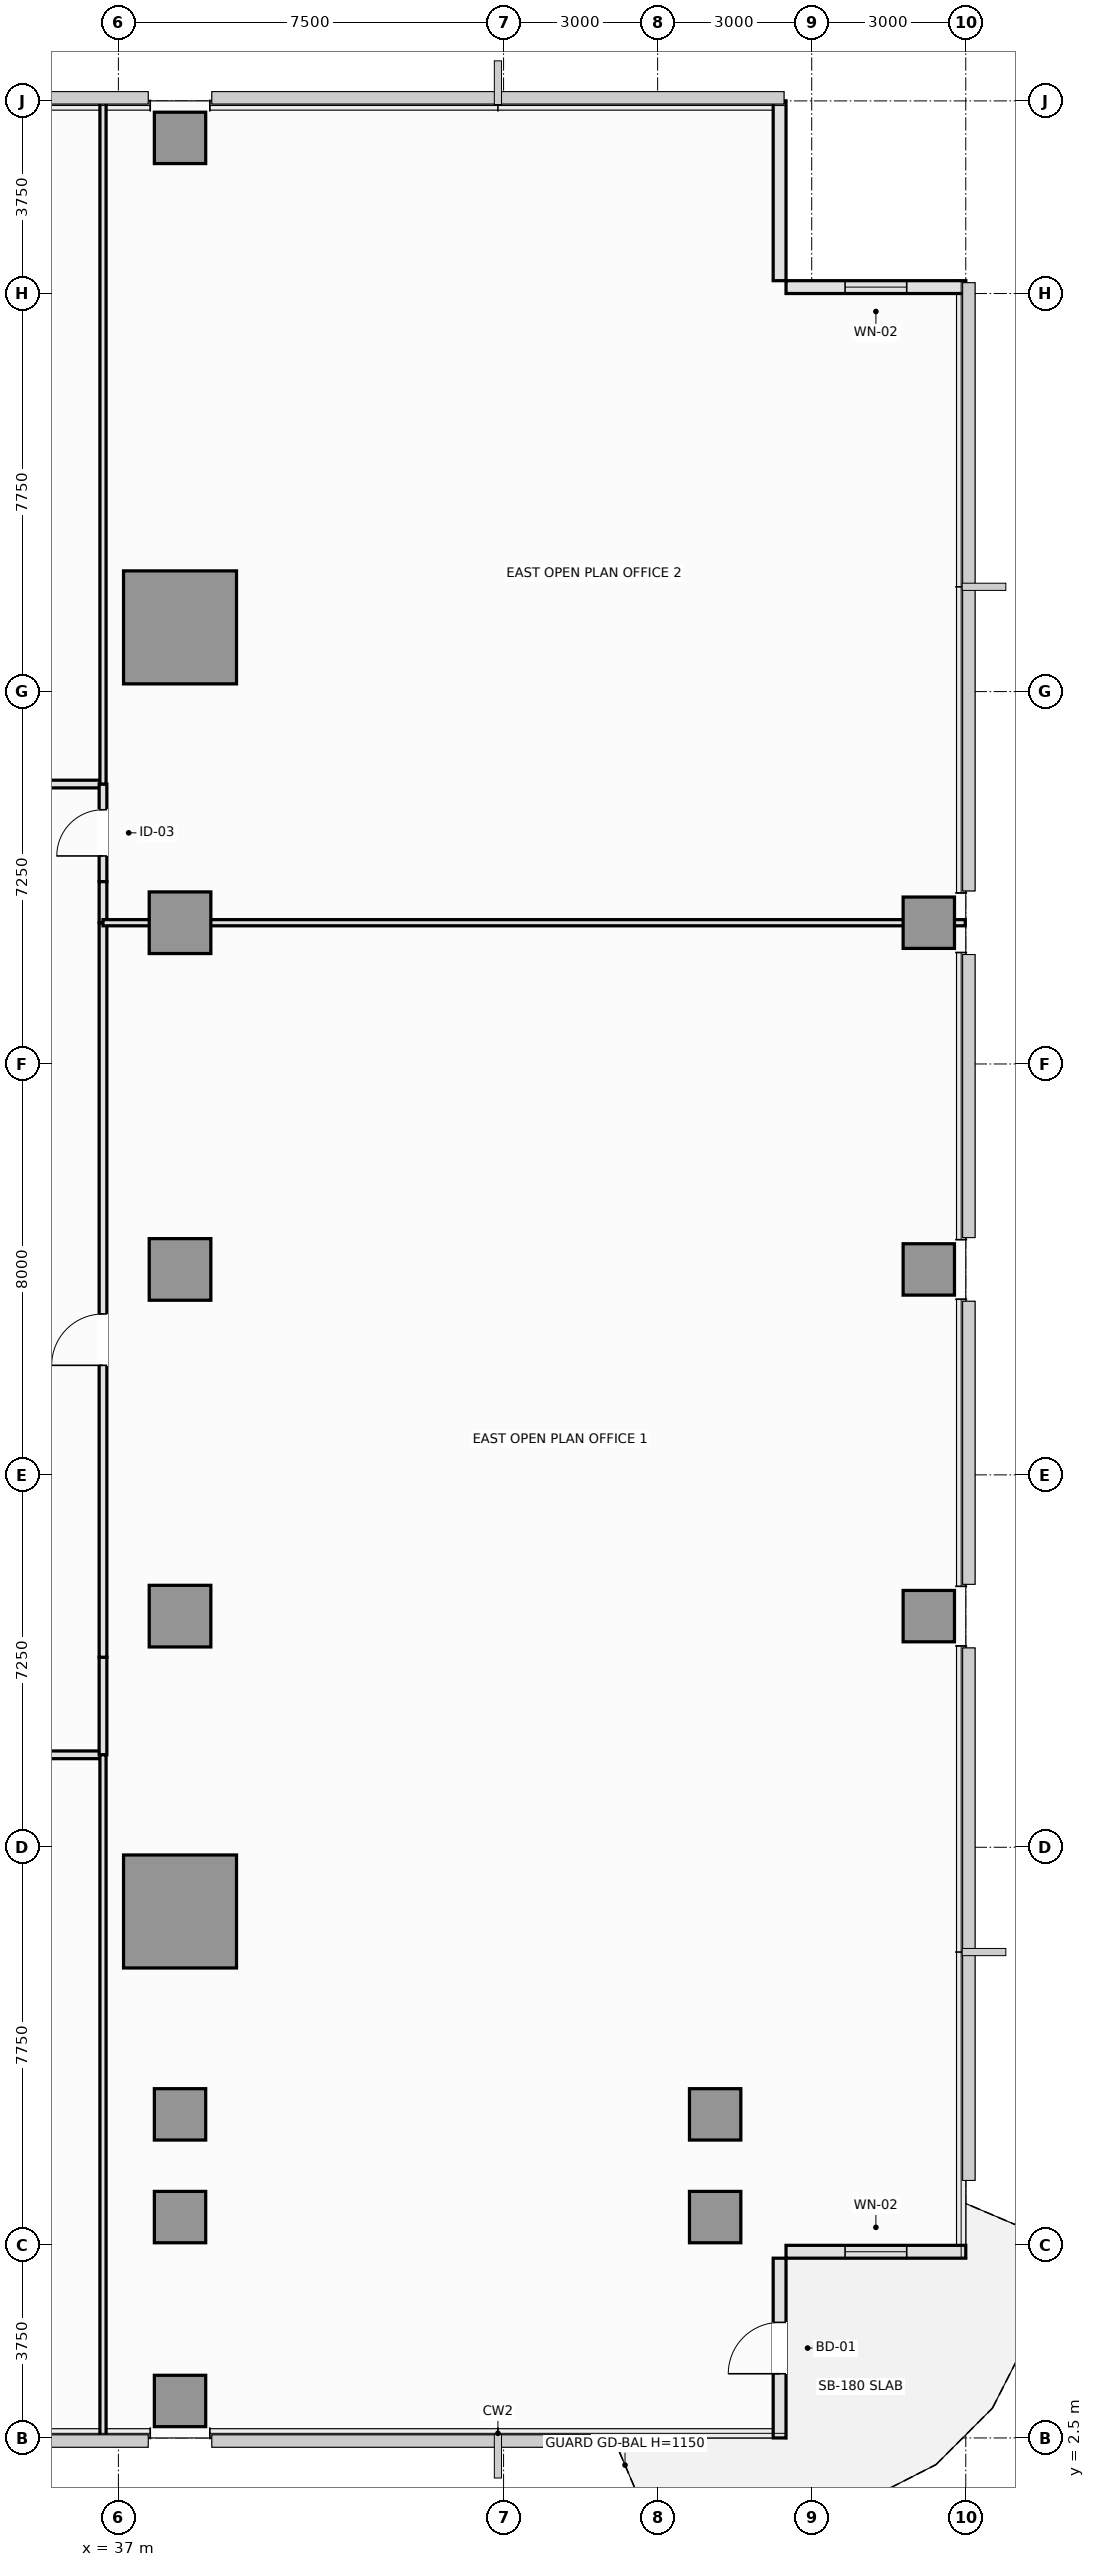
"""IFC4 building model, lengths in metres.
Left out: names, types, materials, properties, quantities, classifications, styles, units other than length and angle.
Written with IfcOpenShell. Run it as: python <this file> out.ifc"""

import sys

from ifc_helpers import new_model, si_unit, direction, frame, frame_2d, origin, origin_2d, place, context, subcontext, project, spatial, rectangle, extrude, element, fill, save


model = new_model("IFC4")
c1 = context("Model", 3, precision=1e-05, world=origin(), true_north=direction((0.0, 1.0)))
c2 = subcontext(c1, "Body", "Model", "MODEL_VIEW")
j1 = project(units=[si_unit("LENGTHUNIT", "METRE"), si_unit("PLANEANGLEUNIT", "RADIAN")], contexts=[c1])
p1 = place(None, origin())
s1 = spatial("IfcSite", under=j1, at=p1, CompositionType="ELEMENT")
p2 = place(p1, origin())
s2 = spatial("IfcBuilding", under=s1, at=p2, CompositionType="ELEMENT")
p3 = place(p2, frame((0.0, 0.0, 75.3)))
s3 = spatial("IfcBuildingStorey", under=s2, at=p3, CompositionType="ELEMENT", Elevation=75.3)
for number, where, z_axis, x_axis in (
    (1, (38.2, 12.75, 0.0), (0.0, 0.0, 1.0), (1.0, 0.0, 0.0)),
    (2, (38.2, 37.75, 0.0), (0.0, 0.0, 1.0), (1.0, 0.0, 0.0)),
):
    element("IfcColumn", number, at=place(p3, frame(where, z_axis=z_axis, x_axis=x_axis)), inside=s3, PredefinedType="COLUMN", context=c2, shape_type="SweptSolid", body=[
        extrude(rectangle(XDim=2.2, YDim=2.2, at=origin_2d()), origin(), (0.0, 0.0, 1.0), 3.55),
    ])
for number, where, z_axis, x_axis in (
    (3, (38.2, 18.5, 0.0), (0.0, 0.0, 1.0), (1.0, 0.0, 0.0)),
    (4, (38.2, 25.25, 0.0), (0.0, 0.0, 1.0), (1.0, 0.0, 0.0)),
    (5, (38.2, 32.0, 0.0), (0.0, 0.0, 1.0), (1.0, 0.0, 0.0)),
):
    element("IfcColumn", number, at=place(p3, frame(where, z_axis=z_axis, x_axis=x_axis)), inside=s3, PredefinedType="COLUMN", context=c2, shape_type="SweptSolid", body=[
        extrude(rectangle(XDim=1.2, YDim=1.2, at=origin_2d()), origin(), (0.0, 0.0, 1.0), 3.55),
    ])
for number, where, z_axis, x_axis in (
    (6, (48.62, 6.8, 0.0), (0.0, 0.0, 1.0), (1.0, 0.0, 0.0)),
    (7, (38.2, 6.8, 0.0), (0.0, 0.0, 1.0), (1.0, 0.0, 0.0)),
    (8, (38.2, 8.8, 0.0), (0.0, 0.0, 1.0), (1.0, 0.0, 0.0)),
    (9, (48.62, 8.8, 0.0), (0.0, 0.0, 1.0), (1.0, 0.0, 0.0)),
    (10, (52.78, 18.5, 0.0), (0.0, 0.0, 1.0), (1.0, 0.0, 0.0)),
    (11, (52.78, 25.25, 0.0), (0.0, 0.0, 1.0), (1.0, 0.0, 0.0)),
    (12, (52.78, 32.0, 0.0), (0.0, 0.0, 1.0), (1.0, 0.0, 0.0)),
    (13, (38.2, 3.22, 0.0), (0.0, 0.0, 1.0), (1.0, 0.0, 0.0)),
    (14, (38.2, 47.28, 0.0), (0.0, 0.0, 1.0), (1.0, 0.0, 0.0)),
):
    element("IfcColumn", number, at=place(p3, frame(where, z_axis=z_axis, x_axis=x_axis)), inside=s3, PredefinedType="COLUMN", context=c2, shape_type="SweptSolid", body=[
        extrude(rectangle(XDim=1.0, YDim=1.0, at=origin_2d()), origin(), (0.0, 0.0, 1.0), 3.55),
    ])
p4 = place(p3, frame((49.875, 2.5, 0.0), z_axis=(0.0, 0.0, 1.0), x_axis=(0.0, 1.0, 0.0)))
e15 = element("IfcWall", 15, at=p4, inside=s3, PredefinedType="SOLIDWALL", context=c2, shape_type="SweptSolid", body=[
    extrude(rectangle(XDim=3.5, YDim=0.25, at=frame_2d((1.75, 0.0))), origin(), (0.0, 0.0, 1.0), 3.07),
])
p5 = place(p4, frame((1.25, 0.0, 0.0)))
e16 = element("IfcOpeningElement", 16, at=p5, cuts=e15, PredefinedType="OPENING", context=c2, shape_type="SweptSolid", body=[
    extrude(rectangle(XDim=1.0, YDim=2.2, at=frame_2d((0.5, 1.1))), frame((0.0, 0.135, 0.0), z_axis=(0.0, -1.0, 0.0), x_axis=(1.0, 0.0, 0.0)), (0.0, 0.0, 1.0), 0.27),
])
p6 = place(p3, frame((50.0, 6.125, 0.0), z_axis=(0.0, 0.0, 1.0), x_axis=(1.0, 0.0, 0.0)))
e17 = element("IfcWall", 17, at=p6, inside=s3, PredefinedType="SOLIDWALL", context=c2, shape_type="SweptSolid", body=[
    extrude(rectangle(XDim=3.5, YDim=0.25, at=frame_2d((1.75, 0.0))), origin(), (0.0, 0.0, 1.0), 3.07),
])
p7 = place(p6, frame((1.15, 0.0, 0.9)))
e18 = element("IfcOpeningElement", 18, at=p7, cuts=e17, PredefinedType="OPENING", context=c2, shape_type="SweptSolid", body=[
    extrude(rectangle(XDim=1.2, YDim=1.8, at=frame_2d((0.6, 0.9))), frame((0.0, 0.135, 0.0), z_axis=(0.0, -1.0, 0.0), x_axis=(1.0, 0.0, 0.0)), (0.0, 0.0, 1.0), 0.27),
])
p8 = place(p3, frame((53.5, 44.375, 0.0), z_axis=(0.0, 0.0, 1.0), x_axis=(-1.0, 0.0, 0.0)))
e19 = element("IfcWall", 19, at=p8, inside=s3, PredefinedType="SOLIDWALL", context=c2, shape_type="SweptSolid", body=[
    extrude(rectangle(XDim=3.5, YDim=0.25, at=frame_2d((1.75, 0.0))), origin(), (0.0, 0.0, 1.0), 3.37),
])
p9 = place(p8, frame((1.15, 0.0, 0.9)))
e20 = element("IfcOpeningElement", 20, at=p9, cuts=e19, PredefinedType="OPENING", context=c2, shape_type="SweptSolid", body=[
    extrude(rectangle(XDim=1.2, YDim=1.8, at=frame_2d((0.6, 0.9))), frame((0.0, 0.135, 0.0), z_axis=(0.0, -1.0, 0.0), x_axis=(1.0, 0.0, 0.0)), (0.0, 0.0, 1.0), 0.27),
])
p10 = place(p3, frame((49.875, 44.5, 0.0), z_axis=(0.0, 0.0, 1.0), x_axis=(0.0, 1.0, 0.0)))
e21 = element("IfcWall", 21, at=p10, inside=s3, PredefinedType="SOLIDWALL", context=c2, shape_type="SweptSolid", body=[
    extrude(rectangle(XDim=3.5, YDim=0.25, at=frame_2d((1.75, 0.0))), origin(), (0.0, 0.0, 1.0), 3.37),
])
p11 = place(p3, frame((31.8, 15.8, 0.0), z_axis=(0.0, 0.0, 1.0), x_axis=(1.0, 0.0, 0.0)))
e22 = element("IfcWall", 22, at=p11, inside=s3, PredefinedType="PARTITIONING", context=c2, shape_type="SweptSolid", body=[
    extrude(rectangle(XDim=4.9, YDim=0.15, at=frame_2d((2.45, 0.0))), origin(), (0.0, 0.0, 1.0), 3.37),
])
p12 = place(p11, frame((1.95, 0.0, 0.0)))
e23 = element("IfcOpeningElement", 23, at=p12, cuts=e22, PredefinedType="OPENING", context=c2, shape_type="SweptSolid", body=[
    extrude(rectangle(XDim=1.0, YDim=2.15, at=frame_2d((0.5, 1.075))), frame((0.0, 0.085, 0.0), z_axis=(0.0, -1.0, 0.0), x_axis=(1.0, 0.0, 0.0)), (0.0, 0.0, 1.0), 0.17),
])
p13 = place(p3, frame((36.7, 15.8, 0.0), z_axis=(0.0, 0.0, 1.0), x_axis=(0.0, 1.0, 0.0)))
e24 = element("IfcWall", 24, at=p13, inside=s3, PredefinedType="PARTITIONING", context=c2, shape_type="SweptSolid", body=[
    extrude(rectangle(XDim=1.9, YDim=0.15, at=frame_2d((0.95, 0.0))), origin(), (0.0, 0.0, 1.0), 3.37),
])
p14 = place(p3, frame((31.8, 34.7, 0.0), z_axis=(0.0, 0.0, 1.0), x_axis=(1.0, 0.0, 0.0)))
e25 = element("IfcWall", 25, at=p14, inside=s3, PredefinedType="PARTITIONING", context=c2, shape_type="SweptSolid", body=[
    extrude(rectangle(XDim=4.9, YDim=0.15, at=frame_2d((2.45, 0.0))), origin(), (0.0, 0.0, 1.0), 3.37),
])
p15 = place(p14, frame((1.95, 0.0, 0.0)))
e26 = element("IfcOpeningElement", 26, at=p15, cuts=e25, PredefinedType="OPENING", context=c2, shape_type="SweptSolid", body=[
    extrude(rectangle(XDim=1.0, YDim=2.15, at=frame_2d((0.5, 1.075))), frame((0.0, 0.085, 0.0), z_axis=(0.0, -1.0, 0.0), x_axis=(1.0, 0.0, 0.0)), (0.0, 0.0, 1.0), 0.17),
])
p16 = place(p3, frame((36.7, 32.8, 0.0), z_axis=(0.0, 0.0, 1.0), x_axis=(0.0, 1.0, 0.0)))
e27 = element("IfcWall", 27, at=p16, inside=s3, PredefinedType="PARTITIONING", context=c2, shape_type="SweptSolid", body=[
    extrude(rectangle(XDim=1.9, YDim=0.15, at=frame_2d((0.95, 0.0))), origin(), (0.0, 0.0, 1.0), 3.37),
])
p17 = place(p16, frame((0.5, 0.0, 0.0)))
e28 = element("IfcOpeningElement", 28, at=p17, cuts=e27, PredefinedType="OPENING", context=c2, shape_type="SweptSolid", body=[
    extrude(rectangle(XDim=0.9, YDim=2.1, at=frame_2d((0.45, 1.05))), frame((0.0, 0.085, 0.0), z_axis=(0.0, -1.0, 0.0), x_axis=(1.0, 0.0, 0.0)), (0.0, 0.0, 1.0), 0.17),
])
p18 = place(p3, frame((36.7, 17.7, 0.0), z_axis=(0.0, 0.0, 1.0), x_axis=(0.0, 1.0, 0.0)))
e29 = element("IfcWall", 29, at=p18, inside=s3, PredefinedType="PARTITIONING", context=c2, shape_type="SweptSolid", body=[
    extrude(rectangle(XDim=14.3, YDim=0.15, at=frame_2d((7.15, 0.0))), origin(), (0.0, 0.0, 1.0), 3.37),
])
p19 = place(p18, frame((5.683, 0.0, 0.0)))
e30 = element("IfcOpeningElement", 30, at=p19, cuts=e29, PredefinedType="OPENING", context=c2, shape_type="SweptSolid", body=[
    extrude(rectangle(XDim=1.0, YDim=2.15, at=frame_2d((0.5, 1.075))), frame((0.0, 0.085, 0.0), z_axis=(0.0, -1.0, 0.0), x_axis=(1.0, 0.0, 0.0)), (0.0, 0.0, 1.0), 0.17),
])
p20 = place(p3, frame((36.7, 32.0, 0.0), z_axis=(0.0, 0.0, 1.0), x_axis=(0.0, 1.0, 0.0)))
e31 = element("IfcWall", 31, at=p20, inside=s3, PredefinedType="PARTITIONING", context=c2, shape_type="SweptSolid", body=[
    extrude(rectangle(XDim=0.8, YDim=0.15, at=frame_2d((0.4, 0.0))), origin(), (0.0, 0.0, 1.0), 3.37),
])
for number, where, z_axis, x_axis in (
    (32, (36.7, 2.51, 0.0), (0.0, 0.0, 1.0), (0.0, 1.0, 0.0)),
    (33, (36.7, 34.7, 0.0), (0.0, 0.0, 1.0), (0.0, 1.0, 0.0)),
):
    element("IfcWall", number, at=place(p3, frame(where, z_axis=z_axis, x_axis=x_axis)), inside=s3, PredefinedType="PARTITIONING", context=c2, shape_type="SweptSolid", body=[
        extrude(rectangle(XDim=13.29, YDim=0.12, at=frame_2d((6.645, 0.0))), origin(), (0.0, 0.0, 1.0), 3.37),
    ])
p21 = place(p3, frame((36.7, 32.0, 0.0), z_axis=(0.0, 0.0, 1.0), x_axis=(1.0, 0.0, 0.0)))
e34 = element("IfcWall", 34, at=p21, inside=s3, PredefinedType="PARTITIONING", context=c2, shape_type="SweptSolid", body=[
    extrude(rectangle(XDim=16.79, YDim=0.12, at=frame_2d((8.395, 0.0))), origin(), (0.0, 0.0, 1.0), 2.72),
])
p22 = place(p5, frame((1.0, 0.0, 0.0), z_axis=(0.0, 0.0, 1.0), x_axis=(-1.0, 0.0, 0.0)))
e35 = element("IfcDoor", 35, at=p22, inside=s3, OperationType="SINGLE_SWING_LEFT", PredefinedType="DOOR", context=c2, shape_type="SweptSolid", body=[
    extrude(rectangle(XDim=1.0, YDim=2.2, at=frame_2d((0.5, 1.1))), frame((0.0, 0.025, 0.0), z_axis=(0.0, -1.0, 0.0), x_axis=(1.0, 0.0, 0.0)), (0.0, 0.0, 1.0), 0.05),
])
fill(e16, e35)
p23 = place(p7, origin())
e36 = element("IfcWindow", 36, at=p23, inside=s3, PartitioningType="SINGLE_PANEL", PredefinedType="WINDOW", context=c2, shape_type="SweptSolid", body=[
    extrude(rectangle(XDim=1.2, YDim=1.8, at=frame_2d((0.6, 0.9))), frame((0.0, 0.03, 0.0), z_axis=(0.0, -1.0, 0.0), x_axis=(1.0, 0.0, 0.0)), (0.0, 0.0, 1.0), 0.06),
])
fill(e18, e36)
p24 = place(p9, origin())
e37 = element("IfcWindow", 37, at=p24, inside=s3, PartitioningType="SINGLE_PANEL", PredefinedType="WINDOW", context=c2, shape_type="SweptSolid", body=[
    extrude(rectangle(XDim=1.2, YDim=1.8, at=frame_2d((0.6, 0.9))), frame((0.0, 0.03, 0.0), z_axis=(0.0, -1.0, 0.0), x_axis=(1.0, 0.0, 0.0)), (0.0, 0.0, 1.0), 0.06),
])
fill(e20, e37)
p25 = place(p17, origin())
e38 = element("IfcDoor", 38, at=p25, inside=s3, OperationType="SINGLE_SWING_LEFT", PredefinedType="DOOR", context=c2, shape_type="SweptSolid", body=[
    extrude(rectangle(XDim=0.9, YDim=2.1, at=frame_2d((0.45, 1.05))), frame((0.0, 0.025, 0.0), z_axis=(0.0, -1.0, 0.0), x_axis=(1.0, 0.0, 0.0)), (0.0, 0.0, 1.0), 0.05),
])
fill(e28, e38)
p26 = place(p19, origin())
e39 = element("IfcDoor", 39, at=p26, inside=s3, OperationType="SINGLE_SWING_LEFT", PredefinedType="DOOR", context=c2, shape_type="SweptSolid", body=[
    extrude(rectangle(XDim=1.0, YDim=2.15, at=frame_2d((0.5, 1.075))), frame((0.0, 0.025, 0.0), z_axis=(0.0, -1.0, 0.0), x_axis=(1.0, 0.0, 0.0)), (0.0, 0.0, 1.0), 0.05),
])
fill(e30, e39)
save(model, sys.argv[1])
